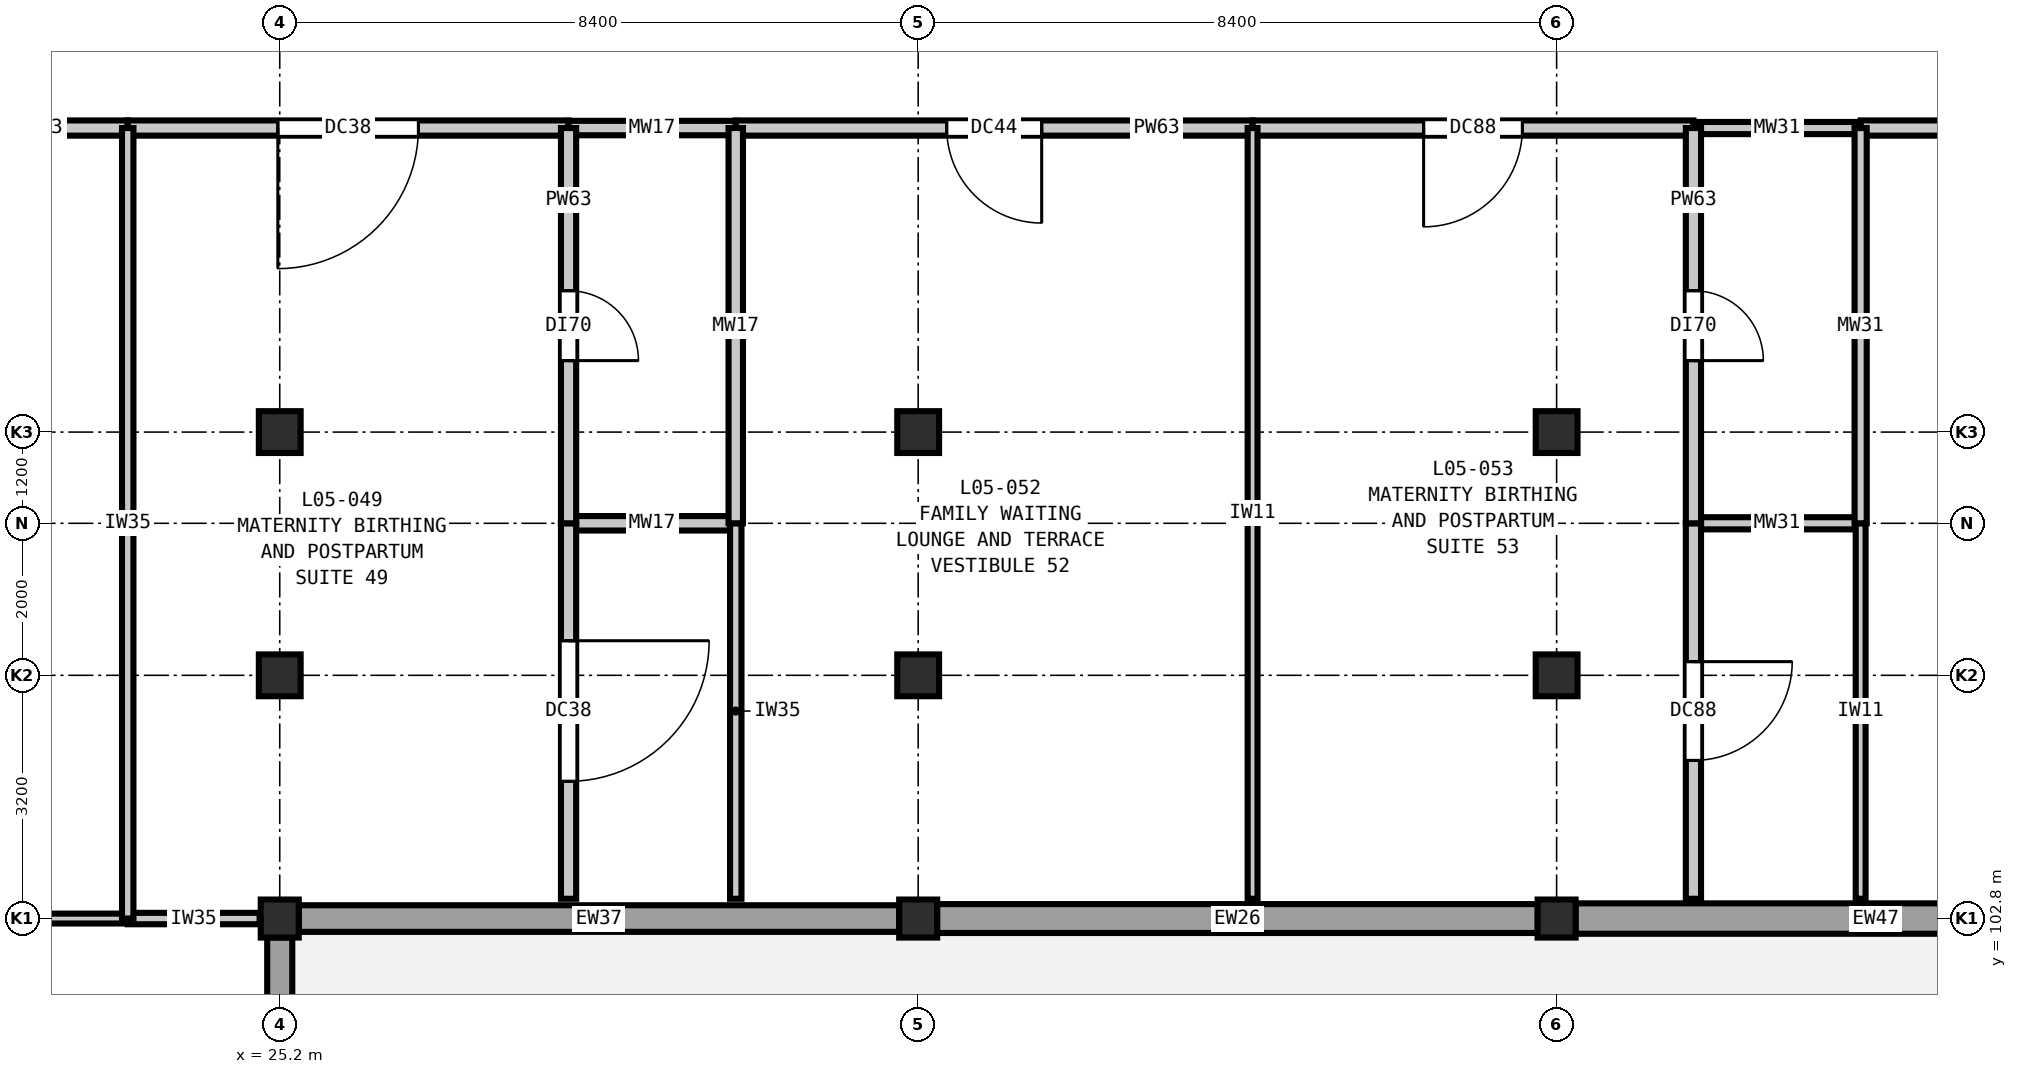
"""IFC4 building model, lengths in metres.
Left out: names, types, materials, properties, quantities, classifications, styles, units other than length and angle.
Written with IfcOpenShell. Run it as: python <this file> out.ifc"""

import sys

from ifc_helpers import new_model, si_unit, direction, frame, frame_2d, origin, origin_2d, place, context, subcontext, project, spatial, rectangle, extrude, element, fill, save


model = new_model("IFC4")
c1 = context("Model", 3, precision=1e-05, world=origin(), true_north=direction((0.0, 1.0)))
c2 = subcontext(c1, "Body", "Model", "MODEL_VIEW")
j1 = project(units=[si_unit("LENGTHUNIT", "METRE"), si_unit("PLANEANGLEUNIT", "RADIAN")], contexts=[c1])
p1 = place(None, origin())
s1 = spatial("IfcSite", under=j1, at=p1, CompositionType="ELEMENT")
p2 = place(p1, origin())
s2 = spatial("IfcBuilding", under=s1, at=p2, CompositionType="ELEMENT")
p3 = place(p2, frame((0.0, 0.0, 24.6)))
s3 = spatial("IfcBuildingStorey", under=s2, at=p3, CompositionType="ELEMENT", Elevation=24.6)
p4 = place(p3, frame((25.2, 102.8, 0.0), z_axis=(0.0, 0.0, 1.0), x_axis=(1.0, 0.0, 0.0)))
e1 = element("IfcColumn", 1, at=p4, inside=s3, PredefinedType="COLUMN", context=c2, shape_type="SweptSolid", body=[
    extrude(rectangle(XDim=0.5, YDim=0.5, at=origin_2d()), origin(), (0.0, 0.0, 1.0), 4.2),
])
for number, where, z_axis, x_axis in (
    (2, (25.2, 106.0, 0.0), (0.0, 0.0, 1.0), (1.0, 0.0, 0.0)),
    (3, (25.2, 109.2, 0.0), (0.0, 0.0, 1.0), (1.0, 0.0, 0.0)),
):
    element("IfcColumn", number, at=place(p3, frame(where, z_axis=z_axis, x_axis=x_axis)), inside=s3, PredefinedType="COLUMN", context=c2, shape_type="SweptSolid", body=[
        extrude(rectangle(XDim=0.55, YDim=0.55, at=origin_2d()), origin(), (0.0, 0.0, 1.0), 4.2),
    ])
p5 = place(p3, frame((33.6, 102.8, 0.0), z_axis=(0.0, 0.0, 1.0), x_axis=(1.0, 0.0, 0.0)))
e4 = element("IfcColumn", 4, at=p5, inside=s3, PredefinedType="COLUMN", context=c2, shape_type="SweptSolid", body=[
    extrude(rectangle(XDim=0.5, YDim=0.5, at=origin_2d()), origin(), (0.0, 0.0, 1.0), 4.2),
])
for number, where, z_axis, x_axis in (
    (5, (33.6, 106.0, 0.0), (0.0, 0.0, 1.0), (1.0, 0.0, 0.0)),
    (6, (33.6, 109.2, 0.0), (0.0, 0.0, 1.0), (1.0, 0.0, 0.0)),
):
    element("IfcColumn", number, at=place(p3, frame(where, z_axis=z_axis, x_axis=x_axis)), inside=s3, PredefinedType="COLUMN", context=c2, shape_type="SweptSolid", body=[
        extrude(rectangle(XDim=0.55, YDim=0.55, at=origin_2d()), origin(), (0.0, 0.0, 1.0), 4.2),
    ])
p6 = place(p3, frame((42.0, 102.8, 0.0), z_axis=(0.0, 0.0, 1.0), x_axis=(1.0, 0.0, 0.0)))
e7 = element("IfcColumn", 7, at=p6, inside=s3, PredefinedType="COLUMN", context=c2, shape_type="SweptSolid", body=[
    extrude(rectangle(XDim=0.5, YDim=0.5, at=origin_2d()), origin(), (0.0, 0.0, 1.0), 4.2),
])
for number, where, z_axis, x_axis in (
    (8, (42.0, 106.0, 0.0), (0.0, 0.0, 1.0), (1.0, 0.0, 0.0)),
    (9, (42.0, 109.2, 0.0), (0.0, 0.0, 1.0), (1.0, 0.0, 0.0)),
):
    element("IfcColumn", number, at=place(p3, frame(where, z_axis=z_axis, x_axis=x_axis)), inside=s3, PredefinedType="COLUMN", context=c2, shape_type="SweptSolid", body=[
        extrude(rectangle(XDim=0.55, YDim=0.55, at=origin_2d()), origin(), (0.0, 0.0, 1.0), 4.2),
    ])
p7 = place(p3, frame((50.152, 102.8, 0.0), z_axis=(0.0, 0.0, 1.0), x_axis=(-1.0, 0.0, 0.0)))
e10 = element("IfcWall", 10, at=p7, inside=s3, PredefinedType="SOLIDWALL", context=c2, shape_type="SweptSolid", body=[
    extrude(rectangle(XDim=7.904, YDim=0.4, at=frame_2d((3.952, 0.0))), origin(), (0.0, 0.0, 1.0), 3.48),
])
p8 = place(p3, frame((41.752, 102.8, 0.0), z_axis=(0.0, 0.0, 1.0), x_axis=(-1.0, 0.0, 0.0)))
e11 = element("IfcWall", 11, at=p8, inside=s3, PredefinedType="SOLIDWALL", context=c2, shape_type="SweptSolid", body=[
    extrude(rectangle(XDim=7.904, YDim=0.38, at=frame_2d((3.952, 0.0))), origin(), (0.0, 0.0, 1.0), 3.48),
])
p9 = place(p3, frame((33.352, 102.8, 0.0), z_axis=(0.0, 0.0, 1.0), x_axis=(-1.0, 0.0, 0.0)))
e12 = element("IfcWall", 12, at=p9, inside=s3, PredefinedType="SOLIDWALL", context=c2, shape_type="SweptSolid", body=[
    extrude(rectangle(XDim=7.904, YDim=0.35, at=frame_2d((3.952, 0.0))), origin(), (0.0, 0.0, 1.0), 3.48),
])
p10 = place(p3, frame((25.2, 102.552, 0.0), z_axis=(0.0, 0.0, 1.0), x_axis=(0.0, -1.0, 0.0)))
e13 = element("IfcWall", 13, at=p10, inside=s3, PredefinedType="SOLIDWALL", context=c2, shape_type="SweptSolid", body=[
    extrude(rectangle(XDim=2.704, YDim=0.33, at=frame_2d((1.352, 0.0))), origin(), (0.0, 0.0, 1.0), 3.48),
])
p11 = place(p10, frame((0.852, 0.0, 0.9)))
e14 = element("IfcOpeningElement", 14, at=p11, cuts=e13, PredefinedType="OPENING", context=c2, shape_type="SweptSolid", body=[
    extrude(rectangle(XDim=1.0, YDim=1.55, at=frame_2d((0.5, 0.775))), frame((0.0, 0.175, 0.0), z_axis=(0.0, -1.0, 0.0), x_axis=(1.0, 0.0, 0.0)), (0.0, 0.0, 1.0), 0.35),
])
p12 = place(p3, frame((17.09, 102.8, 0.0), z_axis=(0.0, 0.0, 1.0), x_axis=(1.0, 0.0, 0.0)))
e15 = element("IfcWall", 15, at=p12, inside=s3, PredefinedType="PARTITIONING", context=c2, shape_type="SweptSolid", body=[
    extrude(rectangle(XDim=6.11, YDim=0.13, at=frame_2d((3.055, 0.0))), origin(), (0.0, 0.0, 1.0), 3.585),
])
p13 = place(p3, frame((23.2, 102.8, 0.0), z_axis=(0.0, 0.0, 1.0), x_axis=(1.0, 0.0, 0.0)))
e16 = element("IfcWall", 16, at=p13, inside=s3, PredefinedType="PARTITIONING", context=c2, shape_type="SweptSolid", body=[
    extrude(rectangle(XDim=1.735, YDim=0.15, at=frame_2d((0.868, 0.0))), origin(), (0.0, 0.0, 1.0), 3.585),
])
p14 = place(p3, frame((29.0, 108.0, 0.0), z_axis=(0.0, 0.0, 1.0), x_axis=(1.0, 0.0, 0.0)))
e17 = element("IfcWall", 17, at=p14, inside=s3, PredefinedType="PLUMBINGWALL", context=c2, shape_type="SweptSolid", body=[
    extrude(rectangle(XDim=2.2, YDim=0.19, at=frame_2d((1.1, 0.0))), origin(), (0.0, 0.0, 1.0), 3.92),
])
p15 = place(p3, frame((43.8, 108.0, 0.0), z_axis=(0.0, 0.0, 1.0), x_axis=(1.0, 0.0, 0.0)))
e18 = element("IfcWall", 18, at=p15, inside=s3, PredefinedType="PLUMBINGWALL", context=c2, shape_type="SweptSolid", body=[
    extrude(rectangle(XDim=2.2, YDim=0.16, at=frame_2d((1.1, 0.0))), origin(), (0.0, 0.0, 1.0), 3.92),
])
p16 = place(p3, frame((16.4, 113.2, 0.0), z_axis=(0.0, 0.0, 1.0), x_axis=(1.0, 0.0, 0.0)))
e19 = element("IfcWall", 19, at=p16, inside=s3, PredefinedType="PARTITIONING", context=c2, shape_type="SweptSolid", body=[
    extrude(rectangle(XDim=6.8, YDim=0.2, at=frame_2d((3.4, 0.0))), origin(), (0.0, 0.0, 1.0), 3.92),
])
p17 = place(p16, frame((2.55, 0.0, 0.0)))
e20 = element("IfcOpeningElement", 20, at=p17, cuts=e19, PredefinedType="OPENING", context=c2, shape_type="SweptSolid", body=[
    extrude(rectangle(XDim=1.7, YDim=2.3, at=frame_2d((0.85, 1.15))), frame((0.0, 0.11, 0.0), z_axis=(0.0, -1.0, 0.0), x_axis=(1.0, 0.0, 0.0)), (0.0, 0.0, 1.0), 0.22),
])
p18 = place(p3, frame((23.2, 113.2, 0.0), z_axis=(0.0, 0.0, 1.0), x_axis=(1.0, 0.0, 0.0)))
e21 = element("IfcWall", 21, at=p18, inside=s3, PredefinedType="PARTITIONING", context=c2, shape_type="SweptSolid", body=[
    extrude(rectangle(XDim=5.8, YDim=0.2, at=frame_2d((2.9, 0.0))), origin(), (0.0, 0.0, 1.0), 3.92),
])
p19 = place(p18, frame((1.975, 0.0, 0.0)))
e22 = element("IfcOpeningElement", 22, at=p19, cuts=e21, PredefinedType="OPENING", context=c2, shape_type="SweptSolid", body=[
    extrude(rectangle(XDim=1.85, YDim=2.3, at=frame_2d((0.925, 1.15))), frame((0.0, 0.11, 0.0), z_axis=(0.0, -1.0, 0.0), x_axis=(1.0, 0.0, 0.0)), (0.0, 0.0, 1.0), 0.22),
])
p20 = place(p3, frame((29.0, 113.2, 0.0), z_axis=(0.0, 0.0, 1.0), x_axis=(1.0, 0.0, 0.0)))
e23 = element("IfcWall", 23, at=p20, inside=s3, PredefinedType="PLUMBINGWALL", context=c2, shape_type="SweptSolid", body=[
    extrude(rectangle(XDim=2.2, YDim=0.19, at=frame_2d((1.1, 0.0))), origin(), (0.0, 0.0, 1.0), 3.92),
])
p21 = place(p3, frame((31.2, 113.2, 0.0), z_axis=(0.0, 0.0, 1.0), x_axis=(1.0, 0.0, 0.0)))
e24 = element("IfcWall", 24, at=p21, inside=s3, PredefinedType="PARTITIONING", context=c2, shape_type="SweptSolid", body=[
    extrude(rectangle(XDim=6.8, YDim=0.2, at=frame_2d((3.4, 0.0))), origin(), (0.0, 0.0, 1.0), 3.92),
])
p22 = place(p21, frame((2.775, 0.0, 0.0)))
e25 = element("IfcOpeningElement", 25, at=p22, cuts=e24, PredefinedType="OPENING", context=c2, shape_type="SweptSolid", body=[
    extrude(rectangle(XDim=1.25, YDim=2.15, at=frame_2d((0.625, 1.075))), frame((0.0, 0.11, 0.0), z_axis=(0.0, -1.0, 0.0), x_axis=(1.0, 0.0, 0.0)), (0.0, 0.0, 1.0), 0.22),
])
p23 = place(p3, frame((38.0, 113.2, 0.0), z_axis=(0.0, 0.0, 1.0), x_axis=(1.0, 0.0, 0.0)))
e26 = element("IfcWall", 26, at=p23, inside=s3, PredefinedType="PARTITIONING", context=c2, shape_type="SweptSolid", body=[
    extrude(rectangle(XDim=5.8, YDim=0.2, at=frame_2d((2.9, 0.0))), origin(), (0.0, 0.0, 1.0), 3.92),
])
p24 = place(p23, frame((2.25, 0.0, 0.0)))
e27 = element("IfcOpeningElement", 27, at=p24, cuts=e26, PredefinedType="OPENING", context=c2, shape_type="SweptSolid", body=[
    extrude(rectangle(XDim=1.3, YDim=2.2, at=frame_2d((0.65, 1.1))), frame((0.0, 0.11, 0.0), z_axis=(0.0, -1.0, 0.0), x_axis=(1.0, 0.0, 0.0)), (0.0, 0.0, 1.0), 0.22),
])
p25 = place(p3, frame((43.8, 113.2, 0.0), z_axis=(0.0, 0.0, 1.0), x_axis=(1.0, 0.0, 0.0)))
e28 = element("IfcWall", 28, at=p25, inside=s3, PredefinedType="PLUMBINGWALL", context=c2, shape_type="SweptSolid", body=[
    extrude(rectangle(XDim=2.2, YDim=0.16, at=frame_2d((1.1, 0.0))), origin(), (0.0, 0.0, 1.0), 3.92),
])
p26 = place(p3, frame((46.0, 113.2, 0.0), z_axis=(0.0, 0.0, 1.0), x_axis=(1.0, 0.0, 0.0)))
e29 = element("IfcWall", 29, at=p26, inside=s3, PredefinedType="PARTITIONING", context=c2, shape_type="SweptSolid", body=[
    extrude(rectangle(XDim=6.8, YDim=0.2, at=frame_2d((3.4, 0.0))), origin(), (0.0, 0.0, 1.0), 3.92),
])
p27 = place(p26, frame((2.725, 0.0, 0.0)))
e30 = element("IfcOpeningElement", 30, at=p27, cuts=e29, PredefinedType="OPENING", context=c2, shape_type="SweptSolid", body=[
    extrude(rectangle(XDim=1.35, YDim=2.2, at=frame_2d((0.675, 1.1))), frame((0.0, 0.11, 0.0), z_axis=(0.0, -1.0, 0.0), x_axis=(1.0, 0.0, 0.0)), (0.0, 0.0, 1.0), 0.22),
])
p28 = place(p3, frame((23.2, 102.8, 0.0), z_axis=(0.0, 0.0, 1.0), x_axis=(0.0, 1.0, 0.0)))
e31 = element("IfcWall", 31, at=p28, inside=s3, PredefinedType="PARTITIONING", context=c2, shape_type="SweptSolid", body=[
    extrude(rectangle(XDim=10.4, YDim=0.15, at=frame_2d((5.2, 0.0))), origin(), (0.0, 0.0, 1.0), 3.92),
])
p29 = place(p3, frame((29.0, 103.06, 0.0), z_axis=(0.0, 0.0, 1.0), x_axis=(0.0, 1.0, 0.0)))
e32 = element("IfcWall", 32, at=p29, inside=s3, PredefinedType="PARTITIONING", context=c2, shape_type="SweptSolid", body=[
    extrude(rectangle(XDim=4.94, YDim=0.2, at=frame_2d((2.47, 0.0))), origin(), (0.0, 0.0, 1.0), 3.92),
])
p30 = place(p29, frame((1.545, 0.0, 0.0)))
e33 = element("IfcOpeningElement", 33, at=p30, cuts=e32, PredefinedType="OPENING", context=c2, shape_type="SweptSolid", body=[
    extrude(rectangle(XDim=1.85, YDim=2.3, at=frame_2d((0.925, 1.15))), frame((0.0, 0.11, 0.0), z_axis=(0.0, -1.0, 0.0), x_axis=(1.0, 0.0, 0.0)), (0.0, 0.0, 1.0), 0.22),
])
p31 = place(p3, frame((29.0, 108.0, 0.0), z_axis=(0.0, 0.0, 1.0), x_axis=(0.0, 1.0, 0.0)))
e34 = element("IfcWall", 34, at=p31, inside=s3, PredefinedType="PARTITIONING", context=c2, shape_type="SweptSolid", body=[
    extrude(rectangle(XDim=5.2, YDim=0.2, at=frame_2d((2.6, 0.0))), origin(), (0.0, 0.0, 1.0), 3.92),
])
p32 = place(p31, frame((2.14, 0.0, 0.0)))
e35 = element("IfcOpeningElement", 35, at=p32, cuts=e34, PredefinedType="OPENING", context=c2, shape_type="SweptSolid", body=[
    extrude(rectangle(XDim=0.92, YDim=2.1, at=frame_2d((0.46, 1.05))), frame((0.0, 0.11, 0.0), z_axis=(0.0, -1.0, 0.0), x_axis=(1.0, 0.0, 0.0)), (0.0, 0.0, 1.0), 0.22),
])
p33 = place(p3, frame((31.2, 103.06, 0.0), z_axis=(0.0, 0.0, 1.0), x_axis=(0.0, 1.0, 0.0)))
e36 = element("IfcWall", 36, at=p33, inside=s3, PredefinedType="PARTITIONING", context=c2, shape_type="SweptSolid", body=[
    extrude(rectangle(XDim=4.94, YDim=0.15, at=frame_2d((2.47, 0.0))), origin(), (0.0, 0.0, 1.0), 3.92),
])
p34 = place(p3, frame((31.2, 108.0, 0.0), z_axis=(0.0, 0.0, 1.0), x_axis=(0.0, 1.0, 0.0)))
e37 = element("IfcWall", 37, at=p34, inside=s3, PredefinedType="PLUMBINGWALL", context=c2, shape_type="SweptSolid", body=[
    extrude(rectangle(XDim=5.2, YDim=0.19, at=frame_2d((2.6, 0.0))), origin(), (0.0, 0.0, 1.0), 3.92),
])
p35 = place(p3, frame((38.0, 103.06, 0.0), z_axis=(0.0, 0.0, 1.0), x_axis=(0.0, 1.0, 0.0)))
e38 = element("IfcWall", 38, at=p35, inside=s3, PredefinedType="PARTITIONING", context=c2, shape_type="SweptSolid", body=[
    extrude(rectangle(XDim=10.14, YDim=0.13, at=frame_2d((5.07, 0.0))), origin(), (0.0, 0.0, 1.0), 3.92),
])
p36 = place(p3, frame((43.8, 103.06, 0.0), z_axis=(0.0, 0.0, 1.0), x_axis=(0.0, 1.0, 0.0)))
e39 = element("IfcWall", 39, at=p36, inside=s3, PredefinedType="PARTITIONING", context=c2, shape_type="SweptSolid", body=[
    extrude(rectangle(XDim=4.94, YDim=0.2, at=frame_2d((2.47, 0.0))), origin(), (0.0, 0.0, 1.0), 3.92),
])
p37 = place(p36, frame((1.82, 0.0, 0.0)))
e40 = element("IfcOpeningElement", 40, at=p37, cuts=e39, PredefinedType="OPENING", context=c2, shape_type="SweptSolid", body=[
    extrude(rectangle(XDim=1.3, YDim=2.2, at=frame_2d((0.65, 1.1))), frame((0.0, 0.11, 0.0), z_axis=(0.0, -1.0, 0.0), x_axis=(1.0, 0.0, 0.0)), (0.0, 0.0, 1.0), 0.22),
])
p38 = place(p3, frame((43.8, 108.0, 0.0), z_axis=(0.0, 0.0, 1.0), x_axis=(0.0, 1.0, 0.0)))
e41 = element("IfcWall", 41, at=p38, inside=s3, PredefinedType="PARTITIONING", context=c2, shape_type="SweptSolid", body=[
    extrude(rectangle(XDim=5.2, YDim=0.2, at=frame_2d((2.6, 0.0))), origin(), (0.0, 0.0, 1.0), 3.92),
])
p39 = place(p38, frame((2.14, 0.0, 0.0)))
e42 = element("IfcOpeningElement", 42, at=p39, cuts=e41, PredefinedType="OPENING", context=c2, shape_type="SweptSolid", body=[
    extrude(rectangle(XDim=0.92, YDim=2.1, at=frame_2d((0.46, 1.05))), frame((0.0, 0.11, 0.0), z_axis=(0.0, -1.0, 0.0), x_axis=(1.0, 0.0, 0.0)), (0.0, 0.0, 1.0), 0.22),
])
p40 = place(p3, frame((46.0, 103.06, 0.0), z_axis=(0.0, 0.0, 1.0), x_axis=(0.0, 1.0, 0.0)))
e43 = element("IfcWall", 43, at=p40, inside=s3, PredefinedType="PARTITIONING", context=c2, shape_type="SweptSolid", body=[
    extrude(rectangle(XDim=4.94, YDim=0.13, at=frame_2d((2.47, 0.0))), origin(), (0.0, 0.0, 1.0), 3.92),
])
p41 = place(p3, frame((46.0, 108.0, 0.0), z_axis=(0.0, 0.0, 1.0), x_axis=(0.0, 1.0, 0.0)))
e44 = element("IfcWall", 44, at=p41, inside=s3, PredefinedType="PLUMBINGWALL", context=c2, shape_type="SweptSolid", body=[
    extrude(rectangle(XDim=5.2, YDim=0.16, at=frame_2d((2.6, 0.0))), origin(), (0.0, 0.0, 1.0), 3.92),
])
p42 = place(p19, frame((1.85, 0.0, 0.0), z_axis=(0.0, 0.0, 1.0), x_axis=(-1.0, 0.0, 0.0)))
e45 = element("IfcDoor", 45, at=p42, inside=s3, OperationType="SINGLE_SWING_RIGHT", PredefinedType="DOOR", context=c2, shape_type="SweptSolid", body=[
    extrude(rectangle(XDim=1.85, YDim=2.3, at=frame_2d((0.925, 1.15))), frame((0.0, 0.025, 0.0), z_axis=(0.0, -1.0, 0.0), x_axis=(1.0, 0.0, 0.0)), (0.0, 0.0, 1.0), 0.05),
])
fill(e22, e45)
p43 = place(p22, frame((1.25, 0.0, 0.0), z_axis=(0.0, 0.0, 1.0), x_axis=(-1.0, 0.0, 0.0)))
e46 = element("IfcDoor", 46, at=p43, inside=s3, OperationType="SINGLE_SWING_LEFT", PredefinedType="DOOR", context=c2, shape_type="SweptSolid", body=[
    extrude(rectangle(XDim=1.25, YDim=2.15, at=frame_2d((0.625, 1.075))), frame((0.0, 0.025, 0.0), z_axis=(0.0, -1.0, 0.0), x_axis=(1.0, 0.0, 0.0)), (0.0, 0.0, 1.0), 0.05),
])
fill(e25, e46)
p44 = place(p24, frame((1.3, 0.0, 0.0), z_axis=(0.0, 0.0, 1.0), x_axis=(-1.0, 0.0, 0.0)))
e47 = element("IfcDoor", 47, at=p44, inside=s3, OperationType="SINGLE_SWING_RIGHT", PredefinedType="DOOR", context=c2, shape_type="SweptSolid", body=[
    extrude(rectangle(XDim=1.3, YDim=2.2, at=frame_2d((0.65, 1.1))), frame((0.0, 0.025, 0.0), z_axis=(0.0, -1.0, 0.0), x_axis=(1.0, 0.0, 0.0)), (0.0, 0.0, 1.0), 0.05),
])
fill(e27, e47)
p45 = place(p30, frame((1.85, 0.0, 0.0), z_axis=(0.0, 0.0, 1.0), x_axis=(-1.0, 0.0, 0.0)))
e48 = element("IfcDoor", 48, at=p45, inside=s3, OperationType="SINGLE_SWING_LEFT", PredefinedType="DOOR", context=c2, shape_type="SweptSolid", body=[
    extrude(rectangle(XDim=1.85, YDim=2.3, at=frame_2d((0.925, 1.15))), frame((0.0, 0.025, 0.0), z_axis=(0.0, -1.0, 0.0), x_axis=(1.0, 0.0, 0.0)), (0.0, 0.0, 1.0), 0.05),
])
fill(e33, e48)
p46 = place(p32, frame((0.92, 0.0, 0.0), z_axis=(0.0, 0.0, 1.0), x_axis=(-1.0, 0.0, 0.0)))
e49 = element("IfcDoor", 49, at=p46, inside=s3, OperationType="SINGLE_SWING_RIGHT", PredefinedType="DOOR", context=c2, shape_type="SweptSolid", body=[
    extrude(rectangle(XDim=0.92, YDim=2.1, at=frame_2d((0.46, 1.05))), frame((0.0, 0.025, 0.0), z_axis=(0.0, -1.0, 0.0), x_axis=(1.0, 0.0, 0.0)), (0.0, 0.0, 1.0), 0.05),
])
fill(e35, e49)
p47 = place(p37, frame((1.3, 0.0, 0.0), z_axis=(0.0, 0.0, 1.0), x_axis=(-1.0, 0.0, 0.0)))
e50 = element("IfcDoor", 50, at=p47, inside=s3, OperationType="SINGLE_SWING_LEFT", PredefinedType="DOOR", context=c2, shape_type="SweptSolid", body=[
    extrude(rectangle(XDim=1.3, YDim=2.2, at=frame_2d((0.65, 1.1))), frame((0.0, 0.025, 0.0), z_axis=(0.0, -1.0, 0.0), x_axis=(1.0, 0.0, 0.0)), (0.0, 0.0, 1.0), 0.05),
])
fill(e40, e50)
p48 = place(p39, frame((0.92, 0.0, 0.0), z_axis=(0.0, 0.0, 1.0), x_axis=(-1.0, 0.0, 0.0)))
e51 = element("IfcDoor", 51, at=p48, inside=s3, OperationType="SINGLE_SWING_RIGHT", PredefinedType="DOOR", context=c2, shape_type="SweptSolid", body=[
    extrude(rectangle(XDim=0.92, YDim=2.1, at=frame_2d((0.46, 1.05))), frame((0.0, 0.025, 0.0), z_axis=(0.0, -1.0, 0.0), x_axis=(1.0, 0.0, 0.0)), (0.0, 0.0, 1.0), 0.05),
])
fill(e42, e51)
save(model, sys.argv[1])
